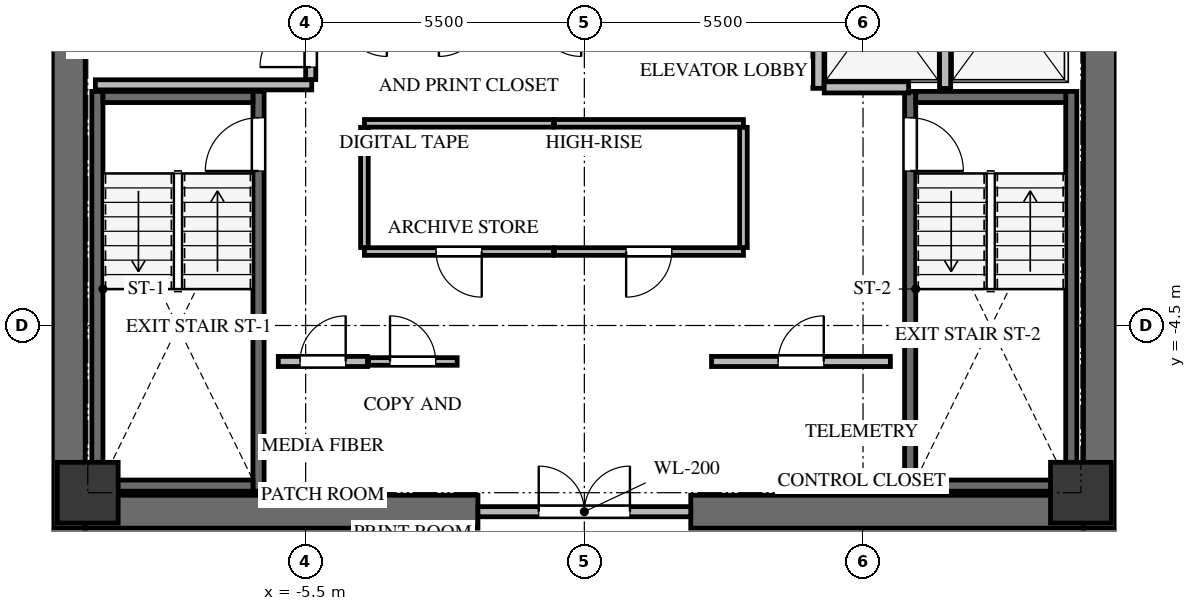
"""IFC4 building model, lengths in metres.
Left out: names, types, materials, properties, quantities, classifications, styles, units other than length and angle.
Written with IfcOpenShell. Run it as: python <this file> out.ifc"""

import sys

from ifc_helpers import new_model, si_unit, direction, frame, frame_2d, origin, origin_2d, place, context, subcontext, project, spatial, rectangle, extrude, source, transform, mapped, element, fill, save


model = new_model("IFC4")
c1 = context("Model", 3, precision=1e-05, world=origin(), true_north=direction((0.0, 1.0)))
c2 = subcontext(c1, "Body", "Model", "MODEL_VIEW")
j1 = project(units=[si_unit("LENGTHUNIT", "METRE"), si_unit("PLANEANGLEUNIT", "RADIAN")], contexts=[c1])
p1 = place(None, origin())
s1 = spatial("IfcSite", under=j1, at=p1, CompositionType="ELEMENT")
p2 = place(p1, origin())
s2 = spatial("IfcBuilding", under=s1, at=p2, CompositionType="ELEMENT")
p3 = place(p2, frame((0.0, 0.0, 203.2)))
s3 = spatial("IfcBuildingStorey", under=s2, at=p3, CompositionType="ELEMENT", Elevation=203.2)
for number, where, z_axis, x_axis in (
    (1, (-10.175, -8.5, 0.0), (0.0, 0.0, 1.0), (0.0, 1.0, 0.0)),
    (2, (10.175, -8.5, 0.0), (0.0, 0.0, 1.0), (0.0, 1.0, 0.0)),
):
    element("IfcWall", number, at=place(p3, frame(where, z_axis=z_axis, x_axis=x_axis)), inside=s3, PredefinedType="SHEAR", context=c2, shape_type="SweptSolid", body=[
        extrude(rectangle(XDim=17.0, YDim=0.65, at=frame_2d((8.5, 0.0))), origin(), (0.0, 0.0, 1.0), 3.0),
    ])
for number, where, z_axis, x_axis in (
    (3, (-9.85, -8.175, 0.0), (0.0, 0.0, 1.0), (1.0, 0.0, 0.0)),
    (4, (2.1, -8.175, 0.0), (0.0, 0.0, 1.0), (1.0, 0.0, 0.0)),
):
    element("IfcWall", number, at=place(p3, frame(where, z_axis=z_axis, x_axis=x_axis)), inside=s3, PredefinedType="SHEAR", context=c2, shape_type="SweptSolid", body=[
        extrude(rectangle(XDim=7.75, YDim=0.65, at=frame_2d((3.875, 0.0))), origin(), (0.0, 0.0, 1.0), 3.0),
    ])
p4 = place(p3, frame((-6.43, -7.77, -0.24), z_axis=(0.0, 0.0, 1.0), x_axis=(0.0, 1.0, 0.0)))
e5 = element("IfcWall", 5, at=p4, inside=s3, PredefinedType="SHEAR", context=c2, shape_type="SweptSolid", body=[
    extrude(rectangle(XDim=7.89, YDim=0.22, at=frame_2d((3.945, 0.0))), origin(), (0.0, 0.0, 1.0), 3.0),
])
p5 = place(p4, frame((6.32, 0.0, 0.0)))
e6 = element("IfcOpeningElement", 6, at=p5, cuts=e5, PredefinedType="OPENING", context=c2, shape_type="SweptSolid", body=[
    extrude(rectangle(XDim=1.05, YDim=2.15, at=frame_2d((0.525, 1.075))), frame((0.0, 0.12, 0.0), z_axis=(0.0, -1.0, 0.0), x_axis=(1.0, 0.0, 0.0)), (0.0, 0.0, 1.0), 0.24),
])
p6 = place(p3, frame((-9.61, 0.12, -0.24), z_axis=(0.0, 0.0, 1.0), x_axis=(0.0, -1.0, 0.0)))
e7 = element("IfcWall", 7, at=p6, inside=s3, PredefinedType="SHEAR", context=c2, shape_type="SweptSolid", body=[
    extrude(rectangle(XDim=7.89, YDim=0.22, at=frame_2d((3.945, 0.0))), origin(), (0.0, 0.0, 1.0), 3.0),
])
for number, where, z_axis, x_axis in (
    (8, (-9.5, -7.66, -0.24), (0.0, 0.0, 1.0), (1.0, 0.0, 0.0)),
    (9, (-6.54, 0.01, -0.24), (0.0, 0.0, 1.0), (-1.0, 0.0, 0.0)),
):
    element("IfcWall", number, at=place(p3, frame(where, z_axis=z_axis, x_axis=x_axis)), inside=s3, PredefinedType="SHEAR", context=c2, shape_type="SweptSolid", body=[
        extrude(rectangle(XDim=2.96, YDim=0.22, at=frame_2d((1.48, 0.0))), origin(), (0.0, 0.0, 1.0), 3.0),
    ])
p7 = place(p3, frame((9.61, -7.77, -0.24), z_axis=(0.0, 0.0, 1.0), x_axis=(0.0, 1.0, 0.0)))
e10 = element("IfcWall", 10, at=p7, inside=s3, PredefinedType="SHEAR", context=c2, shape_type="SweptSolid", body=[
    extrude(rectangle(XDim=7.89, YDim=0.22, at=frame_2d((3.945, 0.0))), origin(), (0.0, 0.0, 1.0), 3.0),
])
p8 = place(p3, frame((6.43, 0.12, -0.24), z_axis=(0.0, 0.0, 1.0), x_axis=(0.0, -1.0, 0.0)))
e11 = element("IfcWall", 11, at=p8, inside=s3, PredefinedType="SHEAR", context=c2, shape_type="SweptSolid", body=[
    extrude(rectangle(XDim=7.89, YDim=0.22, at=frame_2d((3.945, 0.0))), origin(), (0.0, 0.0, 1.0), 3.0),
])
p9 = place(p8, frame((0.52, 0.0, 0.0)))
e12 = element("IfcOpeningElement", 12, at=p9, cuts=e11, PredefinedType="OPENING", context=c2, shape_type="SweptSolid", body=[
    extrude(rectangle(XDim=1.05, YDim=2.15, at=frame_2d((0.525, 1.075))), frame((0.0, 0.12, 0.0), z_axis=(0.0, -1.0, 0.0), x_axis=(1.0, 0.0, 0.0)), (0.0, 0.0, 1.0), 0.24),
])
for number, where, z_axis, x_axis in (
    (13, (6.54, -7.66, -0.24), (0.0, 0.0, 1.0), (1.0, 0.0, 0.0)),
    (14, (9.5, 0.01, -0.24), (0.0, 0.0, 1.0), (-1.0, 0.0, 0.0)),
):
    element("IfcWall", number, at=place(p3, frame(where, z_axis=z_axis, x_axis=x_axis)), inside=s3, PredefinedType="SHEAR", context=c2, shape_type="SweptSolid", body=[
        extrude(rectangle(XDim=2.96, YDim=0.22, at=frame_2d((1.48, 0.0))), origin(), (0.0, 0.0, 1.0), 3.0),
    ])
m1 = source(origin(), c2, "Body", "SweptSolid", [
    extrude(rectangle(XDim=1.2, YDim=1.2, at=origin_2d()), origin(), (0.0, 0.0, 1.0), 3.0),
])
for number, where, z_axis, x_axis in (
    (15, (-9.8, -7.8, -0.24), (0.0, 0.0, 1.0), (1.0, 0.0, 0.0)),
    (16, (9.8, -7.8, -0.24), (0.0, 0.0, 1.0), (1.0, 0.0, 0.0)),
):
    element("IfcColumn", number, at=place(p3, frame(where, z_axis=z_axis, x_axis=x_axis)), inside=s3, PredefinedType="COLUMN", context=c2, shape_type="MappedRepresentation", body=[
        mapped(m1, transform((0.0, 0.0, 0.0), x_axis=(1.0, 0.0, 0.0), y_axis=(0.0, 1.0, 0.0), z_axis=(0.0, 0.0, 1.0), scale=1.0)),
    ])
p10 = place(p3, frame((-2.1, -8.175, 0.0), z_axis=(0.0, 0.0, 1.0), x_axis=(1.0, 0.0, 0.0)))
e17 = element("IfcWall", 17, at=p10, inside=s3, PredefinedType="SOLIDWALL", context=c2, shape_type="SweptSolid", body=[
    extrude(rectangle(XDim=4.2, YDim=0.2, at=frame_2d((2.1, 0.0))), origin(), (0.0, 0.0, 1.0), 2.745),
])
p11 = place(p10, frame((1.2, 0.0, 0.0)))
e18 = element("IfcOpeningElement", 18, at=p11, cuts=e17, PredefinedType="OPENING", context=c2, shape_type="SweptSolid", body=[
    extrude(rectangle(XDim=1.8, YDim=2.15, at=frame_2d((0.9, 1.075))), frame((0.0, 0.11, 0.0), z_axis=(0.0, -1.0, 0.0), x_axis=(1.0, 0.0, 0.0)), (0.0, 0.0, 1.0), 0.22),
])
p12 = place(p3, frame((-9.65, 0.25, 0.0), z_axis=(0.0, 0.0, 1.0), x_axis=(1.0, 0.0, 0.0)))
e19 = element("IfcWall", 19, at=p12, inside=s3, PredefinedType="SOLIDWALL", context=c2, shape_type="SweptSolid", body=[
    extrude(rectangle(XDim=4.27, YDim=0.2, at=frame_2d((2.135, 0.0))), origin(), (0.0, 0.0, 1.0), 2.745),
])
p13 = place(p3, frame((-5.4, 0.354, 0.0), z_axis=(0.0, 0.0, 1.0), x_axis=(0.0, 1.0, 0.0)))
e20 = element("IfcWall", 20, at=p13, inside=s3, PredefinedType="SOLIDWALL", context=c2, shape_type="SweptSolid", body=[
    extrude(rectangle(XDim=4.026, YDim=0.2, at=frame_2d((2.013, 0.0))), origin(), (0.0, 0.0, 1.0), 2.745),
])
p14 = place(p13, frame((0.246, 0.0, 0.0)))
e21 = element("IfcOpeningElement", 21, at=p14, cuts=e20, PredefinedType="OPENING", context=c2, shape_type="SweptSolid", body=[
    extrude(rectangle(XDim=1.0, YDim=2.15, at=frame_2d((0.5, 1.075))), frame((0.0, 0.11, 0.0), z_axis=(0.0, -1.0, 0.0), x_axis=(1.0, 0.0, 0.0)), (0.0, 0.0, 1.0), 0.22),
])
for number, where, z_axis, x_axis in (
    (22, (4.62, 0.18, 0.0), (0.0, 0.0, 1.0), (0.0, 1.0, 0.0)),
    (23, (7.12, 0.18, 0.0), (0.0, 0.0, 1.0), (0.0, 1.0, 0.0)),
):
    element("IfcWall", number, at=place(p3, frame(where, z_axis=z_axis, x_axis=x_axis)), inside=s3, PredefinedType="SOLIDWALL", context=c2, shape_type="SweptSolid", body=[
        extrude(rectangle(XDim=3.186, YDim=0.22, at=frame_2d((1.593, 0.0))), origin(), (0.0, 0.0, 1.0), 2.745),
    ])
p15 = place(p3, frame((4.734, 0.2, 0.0), z_axis=(0.0, 0.0, 1.0), x_axis=(1.0, 0.0, 0.0)))
e24 = element("IfcWall", 24, at=p15, inside=s3, PredefinedType="SOLIDWALL", context=c2, shape_type="SweptSolid", body=[
    extrude(rectangle(XDim=1.666, YDim=0.22, at=frame_2d((0.833, 0.0))), origin(), (0.0, 0.0, 1.0), 2.745),
])
p16 = place(p3, frame((-6.04, -5.21, 0.0), z_axis=(0.0, 0.0, 1.0), x_axis=(1.0, 0.0, 0.0)))
e25 = element("IfcWall", 25, at=p16, inside=s3, PredefinedType="SOLIDWALL", context=c2, shape_type="SweptSolid", body=[
    extrude(rectangle(XDim=1.76, YDim=0.2, at=frame_2d((0.88, 0.0))), origin(), (0.0, 0.0, 1.0), 2.745),
])
p17 = place(p16, frame((0.43, 0.0, 0.0)))
e26 = element("IfcOpeningElement", 26, at=p17, cuts=e25, PredefinedType="OPENING", context=c2, shape_type="SweptSolid", body=[
    extrude(rectangle(XDim=0.9, YDim=2.05, at=frame_2d((0.45, 1.025))), frame((0.0, 0.11, 0.0), z_axis=(0.0, -1.0, 0.0), x_axis=(1.0, 0.0, 0.0)), (0.0, 0.0, 1.0), 0.22),
])
p18 = place(p3, frame((-4.26, -5.21, 0.0), z_axis=(0.0, 0.0, 1.0), x_axis=(1.0, 0.0, 0.0)))
e27 = element("IfcWall", 27, at=p18, inside=s3, PredefinedType="PARTITIONING", context=c2, shape_type="SweptSolid", body=[
    extrude(rectangle(XDim=1.75, YDim=0.15, at=frame_2d((0.875, 0.0))), origin(), (0.0, 0.0, 1.0), 2.745),
])
p19 = place(p18, frame((0.425, 0.0, 0.0)))
e28 = element("IfcOpeningElement", 28, at=p19, cuts=e27, PredefinedType="OPENING", context=c2, shape_type="SweptSolid", body=[
    extrude(rectangle(XDim=0.9, YDim=2.05, at=frame_2d((0.45, 1.025))), frame((0.0, 0.085, 0.0), z_axis=(0.0, -1.0, 0.0), x_axis=(1.0, 0.0, 0.0)), (0.0, 0.0, 1.0), 0.17),
])
p20 = place(p3, frame((2.51, -5.21, 0.0), z_axis=(0.0, 0.0, 1.0), x_axis=(1.0, 0.0, 0.0)))
e29 = element("IfcWall", 29, at=p20, inside=s3, PredefinedType="SOLIDWALL", context=c2, shape_type="SweptSolid", body=[
    extrude(rectangle(XDim=3.53, YDim=0.2, at=frame_2d((1.765, 0.0))), origin(), (0.0, 0.0, 1.0), 2.745),
])
p21 = place(p20, frame((1.315, 0.0, 0.0)))
e30 = element("IfcOpeningElement", 30, at=p21, cuts=e29, PredefinedType="OPENING", context=c2, shape_type="SweptSolid", body=[
    extrude(rectangle(XDim=0.9, YDim=2.05, at=frame_2d((0.45, 1.025))), frame((0.0, 0.11, 0.0), z_axis=(0.0, -1.0, 0.0), x_axis=(1.0, 0.0, 0.0)), (0.0, 0.0, 1.0), 0.22),
])
p22 = place(p3, frame((-0.61, -3.04, 0.0), z_axis=(0.0, 0.0, 1.0), x_axis=(-1.0, 0.0, 0.0)))
e31 = element("IfcWall", 31, at=p22, inside=s3, PredefinedType="PARTITIONING", context=c2, shape_type="SweptSolid", body=[
    extrude(rectangle(XDim=3.73, YDim=0.15, at=frame_2d((1.865, 0.0))), origin(), (0.0, 0.0, 1.0), 2.745),
])
p23 = place(p22, frame((1.415, 0.0, 0.0)))
e32 = element("IfcOpeningElement", 32, at=p23, cuts=e31, PredefinedType="OPENING", context=c2, shape_type="SweptSolid", body=[
    extrude(rectangle(XDim=0.9, YDim=2.05, at=frame_2d((0.45, 1.025))), frame((0.0, 0.085, 0.0), z_axis=(0.0, -1.0, 0.0), x_axis=(1.0, 0.0, 0.0)), (0.0, 0.0, 1.0), 0.17),
])
p24 = place(p3, frame((-4.34, -0.51, 0.0), z_axis=(0.0, 0.0, 1.0), x_axis=(1.0, 0.0, 0.0)))
e33 = element("IfcWall", 33, at=p24, inside=s3, PredefinedType="PARTITIONING", context=c2, shape_type="SweptSolid", body=[
    extrude(rectangle(XDim=3.73, YDim=0.15, at=frame_2d((1.865, 0.0))), origin(), (0.0, 0.0, 1.0), 2.745),
])
p25 = place(p3, frame((-4.34, -2.961, 0.0), z_axis=(0.0, 0.0, 1.0), x_axis=(0.0, 1.0, 0.0)))
e34 = element("IfcWall", 34, at=p25, inside=s3, PredefinedType="PARTITIONING", context=c2, shape_type="SweptSolid", body=[
    extrude(rectangle(XDim=2.372, YDim=0.15, at=frame_2d((1.186, 0.0))), origin(), (0.0, 0.0, 1.0), 2.745),
])
p26 = place(p3, frame((3.14, -3.04, 0.0), z_axis=(0.0, 0.0, 1.0), x_axis=(-1.0, 0.0, 0.0)))
e35 = element("IfcWall", 35, at=p26, inside=s3, PredefinedType="PARTITIONING", context=c2, shape_type="SweptSolid", body=[
    extrude(rectangle(XDim=3.73, YDim=0.15, at=frame_2d((1.865, 0.0))), origin(), (0.0, 0.0, 1.0), 2.745),
])
p27 = place(p26, frame((1.415, 0.0, 0.0)))
e36 = element("IfcOpeningElement", 36, at=p27, cuts=e35, PredefinedType="OPENING", context=c2, shape_type="SweptSolid", body=[
    extrude(rectangle(XDim=0.9, YDim=2.05, at=frame_2d((0.45, 1.025))), frame((0.0, 0.085, 0.0), z_axis=(0.0, -1.0, 0.0), x_axis=(1.0, 0.0, 0.0)), (0.0, 0.0, 1.0), 0.17),
])
p28 = place(p3, frame((-0.59, -0.51, 0.0), z_axis=(0.0, 0.0, 1.0), x_axis=(1.0, 0.0, 0.0)))
e37 = element("IfcWall", 37, at=p28, inside=s3, PredefinedType="PARTITIONING", context=c2, shape_type="SweptSolid", body=[
    extrude(rectangle(XDim=3.73, YDim=0.15, at=frame_2d((1.865, 0.0))), origin(), (0.0, 0.0, 1.0), 2.745),
])
p29 = place(p3, frame((3.14, -0.589, 0.0), z_axis=(0.0, 0.0, 1.0), x_axis=(0.0, -1.0, 0.0)))
e38 = element("IfcWall", 38, at=p29, inside=s3, PredefinedType="PARTITIONING", context=c2, shape_type="SweptSolid", body=[
    extrude(rectangle(XDim=2.372, YDim=0.15, at=frame_2d((1.186, 0.0))), origin(), (0.0, 0.0, 1.0), 2.745),
])
m2 = source(origin(), c2, "Body", "SweptSolid", [
    extrude(rectangle(XDim=1.05, YDim=2.15, at=frame_2d((0.525, 1.075))), frame((0.0, 0.025, 0.0), z_axis=(0.0, -1.0, 0.0), x_axis=(1.0, 0.0, 0.0)), (0.0, 0.0, 1.0), 0.05),
])
p30 = place(p5, origin())
e39 = element("IfcDoor", 39, at=p30, inside=s3, OperationType="SINGLE_SWING_LEFT", PredefinedType="DOOR", context=c2, shape_type="MappedRepresentation", body=[
    mapped(m2, transform((0.0, 0.0, 0.0), x_axis=(1.0, 0.0, 0.0), y_axis=(0.0, 1.0, 0.0), z_axis=(0.0, 0.0, 1.0), scale=1.0)),
])
fill(e6, e39)
m3 = source(origin(), c2, "Body", "SweptSolid", [
    extrude(rectangle(XDim=1.05, YDim=2.15, at=frame_2d((0.525, 1.075))), frame((0.0, 0.025, 0.0), z_axis=(0.0, -1.0, 0.0), x_axis=(1.0, 0.0, 0.0)), (0.0, 0.0, 1.0), 0.05),
])
p31 = place(p9, origin())
e40 = element("IfcDoor", 40, at=p31, inside=s3, OperationType="SINGLE_SWING_RIGHT", PredefinedType="DOOR", context=c2, shape_type="MappedRepresentation", body=[
    mapped(m3, transform((0.0, 0.0, 0.0), x_axis=(1.0, 0.0, 0.0), y_axis=(0.0, 1.0, 0.0), z_axis=(0.0, 0.0, 1.0), scale=1.0)),
])
fill(e12, e40)
m4 = source(origin(), c2, "Body", "SweptSolid", [
    extrude(rectangle(XDim=1.8, YDim=2.15, at=frame_2d((0.9, 1.075))), frame((0.0, 0.025, 0.0), z_axis=(0.0, -1.0, 0.0), x_axis=(1.0, 0.0, 0.0)), (0.0, 0.0, 1.0), 0.05),
])
p32 = place(p11, origin())
e41 = element("IfcDoor", 41, at=p32, inside=s3, OperationType="DOUBLE_DOOR_SINGLE_SWING", PredefinedType="DOOR", context=c2, shape_type="MappedRepresentation", body=[
    mapped(m4, transform((0.0, 0.0, 0.0), x_axis=(1.0, 0.0, 0.0), y_axis=(0.0, 1.0, 0.0), z_axis=(0.0, 0.0, 1.0), scale=1.0)),
])
fill(e18, e41)
m5 = source(origin(), c2, "Body", "SweptSolid", [
    extrude(rectangle(XDim=1.0, YDim=2.15, at=frame_2d((0.5, 1.075))), frame((0.0, 0.025, 0.0), z_axis=(0.0, -1.0, 0.0), x_axis=(1.0, 0.0, 0.0)), (0.0, 0.0, 1.0), 0.05),
])
p33 = place(p14, origin())
e42 = element("IfcDoor", 42, at=p33, inside=s3, OperationType="SINGLE_SWING_LEFT", PredefinedType="DOOR", context=c2, shape_type="MappedRepresentation", body=[
    mapped(m5, transform((0.0, 0.0, 0.0), x_axis=(1.0, 0.0, 0.0), y_axis=(0.0, 1.0, 0.0), z_axis=(0.0, 0.0, 1.0), scale=1.0)),
])
fill(e21, e42)
m6 = source(origin(), c2, "Body", "SweptSolid", [
    extrude(rectangle(XDim=0.9, YDim=2.05, at=frame_2d((0.45, 1.025))), frame((0.0, 0.025, 0.0), z_axis=(0.0, -1.0, 0.0), x_axis=(1.0, 0.0, 0.0)), (0.0, 0.0, 1.0), 0.05),
])
p34 = place(p17, origin())
e43 = element("IfcDoor", 43, at=p34, inside=s3, OperationType="SINGLE_SWING_RIGHT", PredefinedType="DOOR", context=c2, shape_type="MappedRepresentation", body=[
    mapped(m6, transform((0.0, 0.0, 0.0), x_axis=(1.0, 0.0, 0.0), y_axis=(0.0, 1.0, 0.0), z_axis=(0.0, 0.0, 1.0), scale=1.0)),
])
fill(e26, e43)
m7 = source(origin(), c2, "Body", "SweptSolid", [
    extrude(rectangle(XDim=0.9, YDim=2.05, at=frame_2d((0.45, 1.025))), frame((0.0, 0.025, 0.0), z_axis=(0.0, -1.0, 0.0), x_axis=(1.0, 0.0, 0.0)), (0.0, 0.0, 1.0), 0.05),
])
p35 = place(p19, origin())
e44 = element("IfcDoor", 44, at=p35, inside=s3, OperationType="SINGLE_SWING_LEFT", PredefinedType="DOOR", context=c2, shape_type="MappedRepresentation", body=[
    mapped(m7, transform((0.0, 0.0, 0.0), x_axis=(1.0, 0.0, 0.0), y_axis=(0.0, 1.0, 0.0), z_axis=(0.0, 0.0, 1.0), scale=1.0)),
])
fill(e28, e44)
p36 = place(p21, origin())
e45 = element("IfcDoor", 45, at=p36, inside=s3, OperationType="SINGLE_SWING_RIGHT", PredefinedType="DOOR", context=c2, shape_type="MappedRepresentation", body=[
    mapped(m6, transform((0.0, 0.0, 0.0), x_axis=(1.0, 0.0, 0.0), y_axis=(0.0, 1.0, 0.0), z_axis=(0.0, 0.0, 1.0), scale=1.0)),
])
fill(e30, e45)
p37 = place(p23, origin())
e46 = element("IfcDoor", 46, at=p37, inside=s3, OperationType="SINGLE_SWING_LEFT", PredefinedType="DOOR", context=c2, shape_type="MappedRepresentation", body=[
    mapped(m7, transform((0.0, 0.0, 0.0), x_axis=(1.0, 0.0, 0.0), y_axis=(0.0, 1.0, 0.0), z_axis=(0.0, 0.0, 1.0), scale=1.0)),
])
fill(e32, e46)
p38 = place(p27, origin())
e47 = element("IfcDoor", 47, at=p38, inside=s3, OperationType="SINGLE_SWING_RIGHT", PredefinedType="DOOR", context=c2, shape_type="MappedRepresentation", body=[
    mapped(m6, transform((0.0, 0.0, 0.0), x_axis=(1.0, 0.0, 0.0), y_axis=(0.0, 1.0, 0.0), z_axis=(0.0, 0.0, 1.0), scale=1.0)),
])
fill(e36, e47)
save(model, sys.argv[1])
